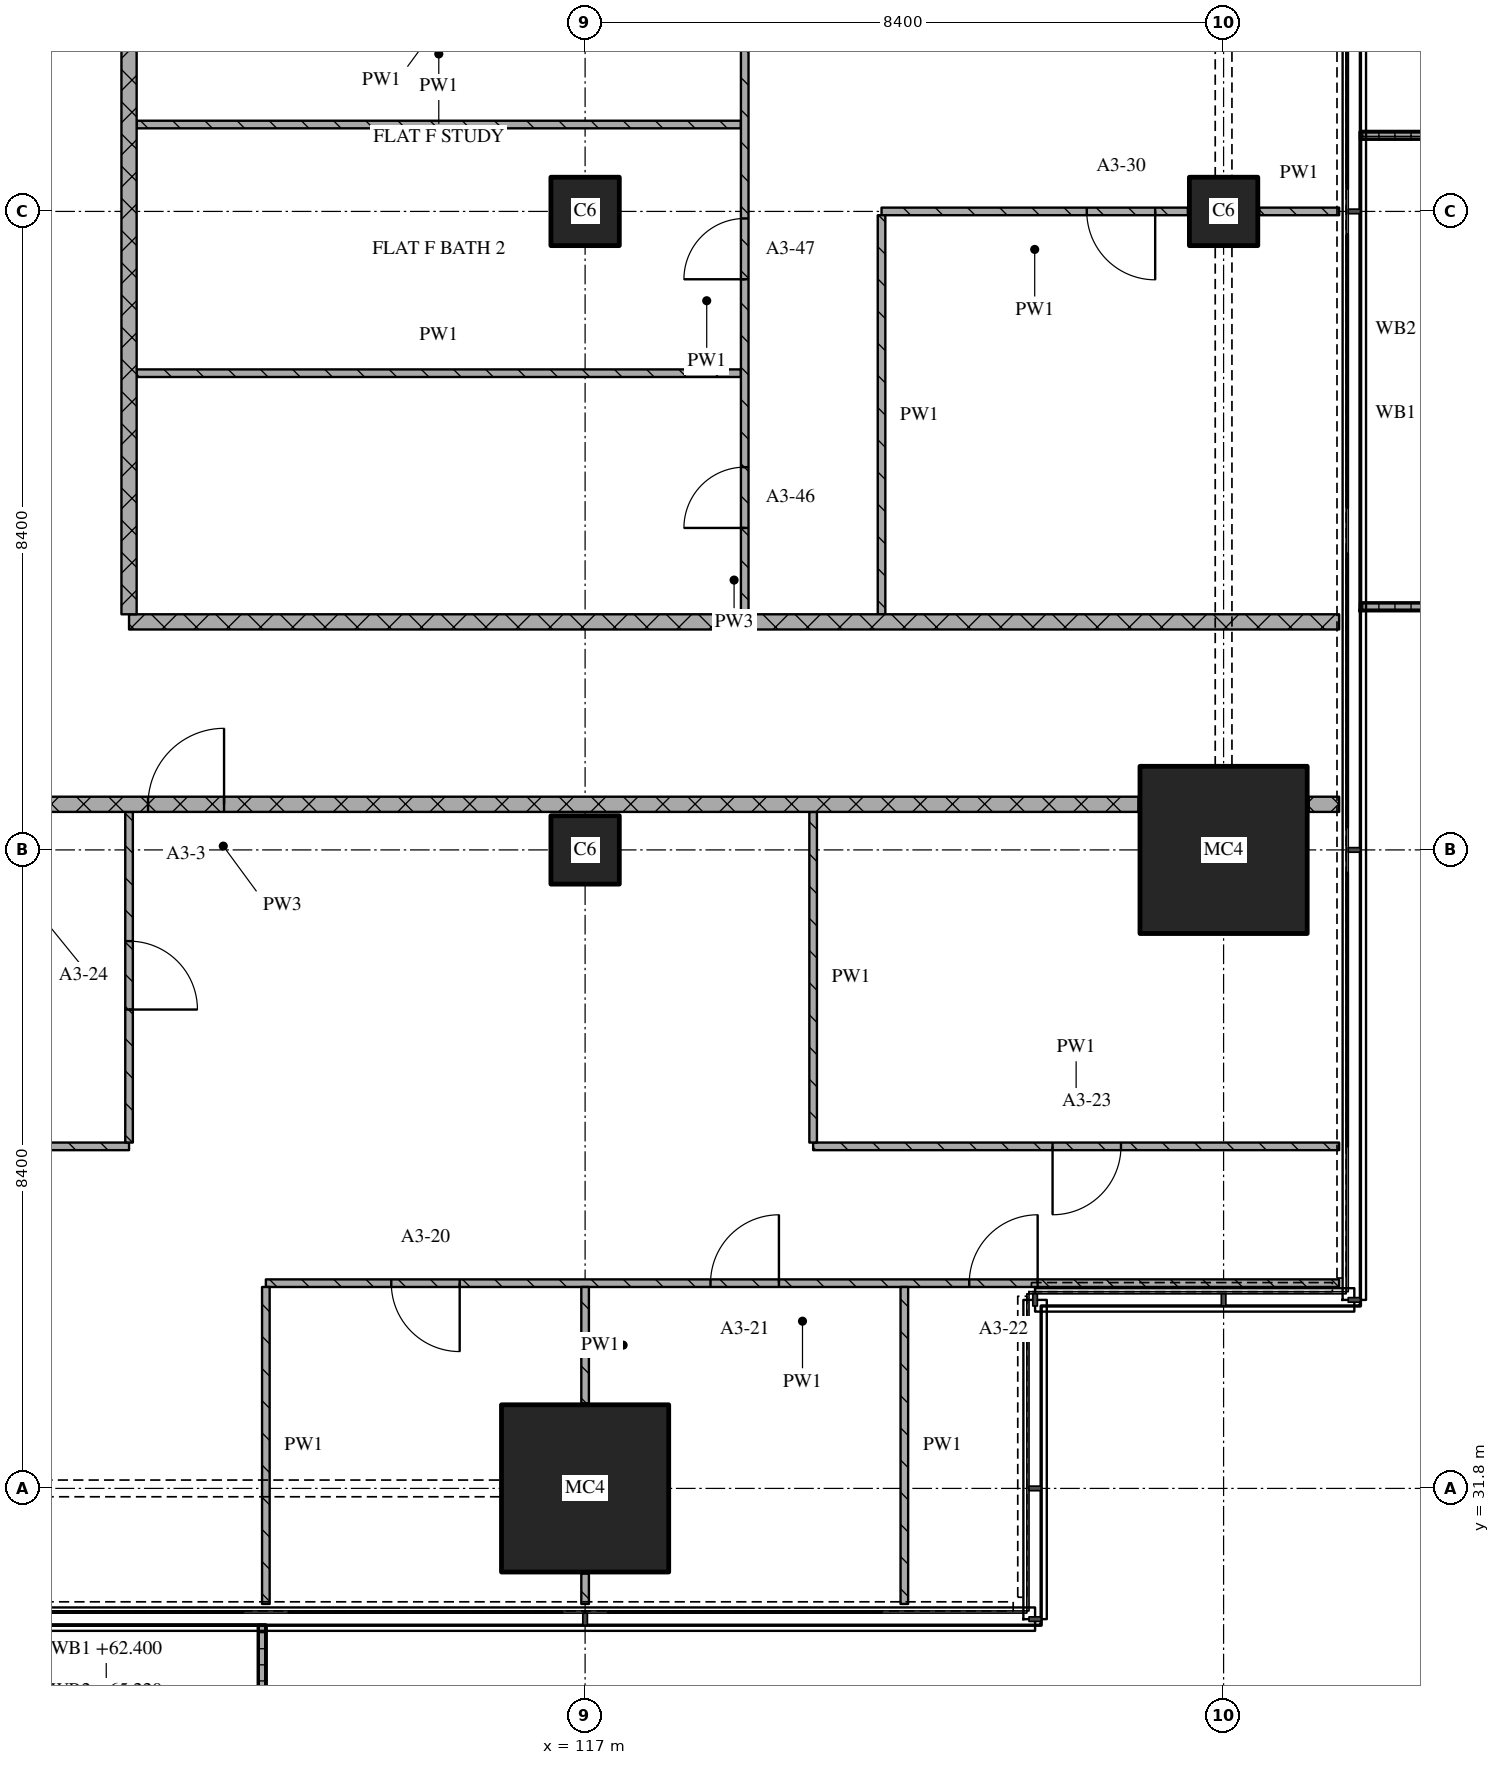
"""IFC4 building model, lengths in metres.
Left out: names, types, materials, properties, quantities, classifications, styles, units other than length and angle.
Written with IfcOpenShell. Run it as: python <this file> out.ifc"""

import sys

from ifc_helpers import new_model, si_unit, direction, frame, frame_2d, origin, origin_2d, place, context, subcontext, project, spatial, polyline, rectangle, outline, extrude, element, fill, save


model = new_model("IFC4")
c1 = context("Model", 3, precision=1e-05, world=origin(), true_north=direction((0.0, 1.0)))
c2 = subcontext(c1, "Body", "Model", "MODEL_VIEW")
j1 = project(units=[si_unit("LENGTHUNIT", "METRE"), si_unit("PLANEANGLEUNIT", "RADIAN")], contexts=[c1])
p1 = place(None, origin())
s1 = spatial("IfcSite", under=j1, at=p1, CompositionType="ELEMENT")
p2 = place(p1, origin())
s2 = spatial("IfcBuilding", under=s1, at=p2, CompositionType="ELEMENT")
p3 = place(p2, frame((0.0, 0.0, 62.4)))
s3 = spatial("IfcBuildingStorey", under=s2, at=p3, CompositionType="ELEMENT", Elevation=62.4)
p4 = place(p3, frame((117.0, 31.8, 0.0), z_axis=(0.0, 0.0, 1.0), x_axis=(1.0, 0.0, 0.0)))
e1 = element("IfcColumn", 1, at=p4, inside=s3, PredefinedType="COLUMN", context=c2, shape_type="SweptSolid", body=[
    extrude(rectangle(XDim=2.2, YDim=2.2, at=origin_2d()), origin(), (0.0, 0.0, 1.0), 3.6),
])
for number, where, z_axis, x_axis in (
    (2, (117.0, 40.2, 0.0), (0.0, 0.0, 1.0), (1.0, 0.0, 0.0)),
    (3, (117.0, 48.6, 0.0), (0.0, 0.0, 1.0), (1.0, 0.0, 0.0)),
):
    element("IfcColumn", number, at=place(p3, frame(where, z_axis=z_axis, x_axis=x_axis)), inside=s3, PredefinedType="COLUMN", context=c2, shape_type="SweptSolid", body=[
        extrude(rectangle(XDim=0.9, YDim=0.9, at=origin_2d()), origin(), (0.0, 0.0, 1.0), 3.6),
    ])
p5 = place(p3, frame((125.4, 40.2, 0.0), z_axis=(0.0, 0.0, 1.0), x_axis=(1.0, 0.0, 0.0)))
e4 = element("IfcColumn", 4, at=p5, inside=s3, PredefinedType="COLUMN", context=c2, shape_type="SweptSolid", body=[
    extrude(rectangle(XDim=2.2, YDim=2.2, at=origin_2d()), origin(), (0.0, 0.0, 1.0), 3.6),
])
p6 = place(p3, frame((125.4, 48.6, 0.0), z_axis=(0.0, 0.0, 1.0), x_axis=(1.0, 0.0, 0.0)))
e5 = element("IfcColumn", 5, at=p6, inside=s3, PredefinedType="COLUMN", context=c2, shape_type="SweptSolid", body=[
    extrude(rectangle(XDim=0.9, YDim=0.9, at=origin_2d()), origin(), (0.0, 0.0, 1.0), 3.6),
])
p7 = place(p3, origin())
e6 = element("IfcWall", 6, at=p7, inside=s3, PredefinedType="SOLIDWALL", context=c2, shape_type="SweptSolid", body=[
    extrude(outline(polyline([(108.6, 30.0), (108.7, 30.0), (108.7, 28.367), (112.7, 28.367), (112.7, 30.0), (112.8, 30.0), (112.8, 28.267), (108.6, 28.267), (108.6, 30.0)])), origin(), (0.0, 0.0, 1.0), 1.0),
])
p8 = place(p3, origin())
e7 = element("IfcWall", 7, at=p8, inside=s3, PredefinedType="SOLIDWALL", context=c2, shape_type="SweptSolid", body=[
    extrude(outline(polyline([(127.2, 43.35), (127.2, 43.45), (128.967, 43.45), (128.967, 49.55), (127.2, 49.55), (127.2, 49.65), (129.067, 49.65), (129.067, 43.35), (127.2, 43.35)])), origin(), (0.0, 0.0, 1.0), 1.0),
])
p9 = place(p3, frame((126.92, 34.5, 0.0), z_axis=(0.0, 0.0, 1.0), x_axis=(-1.0, 0.0, 0.0)))
e8 = element("IfcWall", 8, at=p9, inside=s3, PredefinedType="PARTITIONING", context=c2, shape_type="SweptSolid", body=[
    extrude(rectangle(XDim=14.12, YDim=0.1, at=frame_2d((7.06, 0.0))), origin(), (0.0, 0.0, 1.0), 3.32),
])
p10 = place(p9, frame((3.966, 0.0, 0.0)))
e9 = element("IfcOpeningElement", 9, at=p10, cuts=e8, PredefinedType="OPENING", context=c2, shape_type="SweptSolid", body=[
    extrude(rectangle(XDim=0.9, YDim=2.1, at=frame_2d((0.45, 1.05))), frame((0.0, 0.06, 0.0), z_axis=(0.0, -1.0, 0.0), x_axis=(1.0, 0.0, 0.0)), (0.0, 0.0, 1.0), 0.12),
])
p11 = place(p9, frame((7.37, 0.0, 0.0)))
e10 = element("IfcOpeningElement", 10, at=p11, cuts=e8, PredefinedType="OPENING", context=c2, shape_type="SweptSolid", body=[
    extrude(rectangle(XDim=0.9, YDim=2.1, at=frame_2d((0.45, 1.05))), frame((0.0, 0.06, 0.0), z_axis=(0.0, -1.0, 0.0), x_axis=(1.0, 0.0, 0.0)), (0.0, 0.0, 1.0), 0.12),
])
p12 = place(p9, frame((11.57, 0.0, 0.0)))
e11 = element("IfcOpeningElement", 11, at=p12, cuts=e8, PredefinedType="OPENING", context=c2, shape_type="SweptSolid", body=[
    extrude(rectangle(XDim=0.9, YDim=2.1, at=frame_2d((0.45, 1.05))), frame((0.0, 0.06, 0.0), z_axis=(0.0, -1.0, 0.0), x_axis=(1.0, 0.0, 0.0)), (0.0, 0.0, 1.0), 0.12),
])
p13 = place(p3, frame((100.3, 36.3, 0.0), z_axis=(0.0, 0.0, 1.0), x_axis=(1.0, 0.0, 0.0)))
e12 = element("IfcWall", 12, at=p13, inside=s3, PredefinedType="PARTITIONING", context=c2, shape_type="SweptSolid", body=[
    extrude(rectangle(XDim=10.7, YDim=0.1, at=frame_2d((5.35, 0.0))), origin(), (0.0, 0.0, 1.0), 3.32),
])
p14 = place(p13, frame((1.75, 0.0, 0.0)))
e13 = element("IfcOpeningElement", 13, at=p14, cuts=e12, PredefinedType="OPENING", context=c2, shape_type="SweptSolid", body=[
    extrude(rectangle(XDim=0.8, YDim=2.1, at=frame_2d((0.4, 1.05))), frame((0.0, 0.06, 0.0), z_axis=(0.0, -1.0, 0.0), x_axis=(1.0, 0.0, 0.0)), (0.0, 0.0, 1.0), 0.12),
])
p15 = place(p13, frame((6.25, 0.0, 0.0)))
e14 = element("IfcOpeningElement", 14, at=p15, cuts=e12, PredefinedType="OPENING", context=c2, shape_type="SweptSolid", body=[
    extrude(rectangle(XDim=0.8, YDim=2.1, at=frame_2d((0.4, 1.05))), frame((0.0, 0.06, 0.0), z_axis=(0.0, -1.0, 0.0), x_axis=(1.0, 0.0, 0.0)), (0.0, 0.0, 1.0), 0.12),
])
p16 = place(p3, frame((120.0, 36.3, 0.0), z_axis=(0.0, 0.0, 1.0), x_axis=(1.0, 0.0, 0.0)))
e15 = element("IfcWall", 15, at=p16, inside=s3, PredefinedType="PARTITIONING", context=c2, shape_type="SweptSolid", body=[
    extrude(rectangle(XDim=6.92, YDim=0.1, at=frame_2d((3.46, 0.0))), origin(), (0.0, 0.0, 1.0), 3.32),
])
p17 = place(p16, frame((3.15, 0.0, 0.0)))
e16 = element("IfcOpeningElement", 16, at=p17, cuts=e15, PredefinedType="OPENING", context=c2, shape_type="SweptSolid", body=[
    extrude(rectangle(XDim=0.9, YDim=2.1, at=frame_2d((0.45, 1.05))), frame((0.0, 0.06, 0.0), z_axis=(0.0, -1.0, 0.0), x_axis=(1.0, 0.0, 0.0)), (0.0, 0.0, 1.0), 0.12),
])
p18 = place(p3, frame((124.28, 40.8, 0.0), z_axis=(0.0, 0.0, 1.0), x_axis=(-1.0, 0.0, 0.0)))
e17 = element("IfcWall", 17, at=p18, inside=s3, PredefinedType="PARTITIONING", context=c2, shape_type="SweptSolid", body=[
    extrude(rectangle(XDim=24.08, YDim=0.2, at=frame_2d((12.04, 0.0))), origin(), (0.0, 0.0, 1.0), 3.32),
])
p19 = place(p18, frame((12.03, 0.0, 0.0)))
e18 = element("IfcOpeningElement", 18, at=p19, cuts=e17, PredefinedType="OPENING", context=c2, shape_type="SweptSolid", body=[
    extrude(rectangle(XDim=1.0, YDim=2.1, at=frame_2d((0.5, 1.05))), frame((0.0, 0.11, 0.0), z_axis=(0.0, -1.0, 0.0), x_axis=(1.0, 0.0, 0.0)), (0.0, 0.0, 1.0), 0.22),
])
p20 = place(p3, frame((126.52, 40.8, 0.0), z_axis=(0.0, 0.0, 1.0), x_axis=(1.0, 0.0, 0.0)))
e19 = element("IfcWall", 19, at=p20, inside=s3, PredefinedType="PARTITIONING", context=c2, shape_type="SweptSolid", body=[
    extrude(rectangle(XDim=0.4, YDim=0.2, at=frame_2d((0.2, 0.0))), origin(), (0.0, 0.0, 1.0), 3.32),
])
p21 = place(p3, frame((111.0, 43.2, 0.0), z_axis=(0.0, 0.0, 1.0), x_axis=(1.0, 0.0, 0.0)))
e20 = element("IfcWall", 20, at=p21, inside=s3, PredefinedType="PARTITIONING", context=c2, shape_type="SweptSolid", body=[
    extrude(rectangle(XDim=15.92, YDim=0.2, at=frame_2d((7.96, 0.0))), origin(), (0.0, 0.0, 1.0), 3.32),
])
p22 = place(p3, frame((111.1, 46.472, 0.0), z_axis=(0.0, 0.0, 1.0), x_axis=(1.0, 0.0, 0.0)))
e21 = element("IfcWall", 21, at=p22, inside=s3, PredefinedType="PARTITIONING", context=c2, shape_type="SweptSolid", body=[
    extrude(rectangle(XDim=7.95, YDim=0.1, at=frame_2d((3.975, 0.0))), origin(), (0.0, 0.0, 1.0), 3.32),
])
p23 = place(p3, frame((124.93, 48.6, 0.0), z_axis=(0.0, 0.0, 1.0), x_axis=(-1.0, 0.0, 0.0)))
e22 = element("IfcWall", 22, at=p23, inside=s3, PredefinedType="PARTITIONING", context=c2, shape_type="SweptSolid", body=[
    extrude(rectangle(XDim=4.03, YDim=0.1, at=frame_2d((2.015, 0.0))), origin(), (0.0, 0.0, 1.0), 3.32),
])
p24 = place(p23, frame((0.43, 0.0, 0.0)))
e23 = element("IfcOpeningElement", 23, at=p24, cuts=e22, PredefinedType="OPENING", context=c2, shape_type="SweptSolid", body=[
    extrude(rectangle(XDim=0.9, YDim=2.1, at=frame_2d((0.45, 1.05))), frame((0.0, 0.06, 0.0), z_axis=(0.0, -1.0, 0.0), x_axis=(1.0, 0.0, 0.0)), (0.0, 0.0, 1.0), 0.12),
])
p25 = place(p3, frame((125.87, 48.6, 0.0), z_axis=(0.0, 0.0, 1.0), x_axis=(1.0, 0.0, 0.0)))
e24 = element("IfcWall", 24, at=p25, inside=s3, PredefinedType="PARTITIONING", context=c2, shape_type="SweptSolid", body=[
    extrude(rectangle(XDim=1.05, YDim=0.1, at=frame_2d((0.525, 0.0))), origin(), (0.0, 0.0, 1.0), 3.32),
])
p26 = place(p3, frame((111.1, 49.743, 0.0), z_axis=(0.0, 0.0, 1.0), x_axis=(1.0, 0.0, 0.0)))
e25 = element("IfcWall", 25, at=p26, inside=s3, PredefinedType="PARTITIONING", context=c2, shape_type="SweptSolid", body=[
    extrude(rectangle(XDim=7.95, YDim=0.1, at=frame_2d((3.975, 0.0))), origin(), (0.0, 0.0, 1.0), 3.32),
])
p27 = place(p3, frame((111.0, 75.32, 0.0), z_axis=(0.0, 0.0, 1.0), x_axis=(0.0, -1.0, 0.0)))
e26 = element("IfcWall", 26, at=p27, inside=s3, PredefinedType="PARTITIONING", context=c2, shape_type="SweptSolid", body=[
    extrude(rectangle(XDim=32.02, YDim=0.2, at=frame_2d((16.01, 0.0))), origin(), (0.0, 0.0, 1.0), 3.32),
])
p28 = place(p27, frame((6.27, 0.0, 0.0)))
e27 = element("IfcOpeningElement", 27, at=p28, cuts=e26, PredefinedType="OPENING", context=c2, shape_type="SweptSolid", body=[
    extrude(rectangle(XDim=1.0, YDim=2.1, at=frame_2d((0.5, 1.05))), frame((0.0, 0.11, 0.0), z_axis=(0.0, -1.0, 0.0), x_axis=(1.0, 0.0, 0.0)), (0.0, 0.0, 1.0), 0.22),
])
p29 = place(p27, frame((22.47, 0.0, 0.0)))
e28 = element("IfcOpeningElement", 28, at=p29, cuts=e26, PredefinedType="OPENING", context=c2, shape_type="SweptSolid", body=[
    extrude(rectangle(XDim=1.0, YDim=2.1, at=frame_2d((0.5, 1.05))), frame((0.0, 0.11, 0.0), z_axis=(0.0, -1.0, 0.0), x_axis=(1.0, 0.0, 0.0)), (0.0, 0.0, 1.0), 0.22),
])
p30 = place(p3, frame((111.0, 36.35, 0.0), z_axis=(0.0, 0.0, 1.0), x_axis=(0.0, 1.0, 0.0)))
e29 = element("IfcWall", 29, at=p30, inside=s3, PredefinedType="PARTITIONING", context=c2, shape_type="SweptSolid", body=[
    extrude(rectangle(XDim=4.35, YDim=0.1, at=frame_2d((2.175, 0.0))), origin(), (0.0, 0.0, 1.0), 3.32),
])
p31 = place(p30, frame((1.75, 0.0, 0.0)))
e30 = element("IfcOpeningElement", 30, at=p31, cuts=e29, PredefinedType="OPENING", context=c2, shape_type="SweptSolid", body=[
    extrude(rectangle(XDim=0.9, YDim=2.1, at=frame_2d((0.45, 1.05))), frame((0.0, 0.06, 0.0), z_axis=(0.0, -1.0, 0.0), x_axis=(1.0, 0.0, 0.0)), (0.0, 0.0, 1.0), 0.12),
])
p32 = place(p3, frame((112.8, 34.45, 0.0), z_axis=(0.0, 0.0, 1.0), x_axis=(0.0, -1.0, 0.0)))
e31 = element("IfcWall", 31, at=p32, inside=s3, PredefinedType="PARTITIONING", context=c2, shape_type="SweptSolid", body=[
    extrude(rectangle(XDim=4.17, YDim=0.1, at=frame_2d((2.085, 0.0))), origin(), (0.0, 0.0, 1.0), 3.32),
])
p33 = place(p3, frame((117.0, 30.68, 0.0), z_axis=(0.0, 0.0, 1.0), x_axis=(0.0, -1.0, 0.0)))
e32 = element("IfcWall", 32, at=p33, inside=s3, PredefinedType="PARTITIONING", context=c2, shape_type="SweptSolid", body=[
    extrude(rectangle(XDim=0.4, YDim=0.1, at=frame_2d((0.2, 0.0))), origin(), (0.0, 0.0, 1.0), 3.32),
])
p34 = place(p3, frame((117.0, 34.45, 0.0), z_axis=(0.0, 0.0, 1.0), x_axis=(0.0, -1.0, 0.0)))
e33 = element("IfcWall", 33, at=p34, inside=s3, PredefinedType="PARTITIONING", context=c2, shape_type="SweptSolid", body=[
    extrude(rectangle(XDim=1.53, YDim=0.1, at=frame_2d((0.765, 0.0))), origin(), (0.0, 0.0, 1.0), 3.32),
])
p35 = place(p3, frame((119.1, 43.3, 0.0), z_axis=(0.0, 0.0, 1.0), x_axis=(0.0, 1.0, 0.0)))
e34 = element("IfcWall", 34, at=p35, inside=s3, PredefinedType="PARTITIONING", context=c2, shape_type="SweptSolid", body=[
    extrude(rectangle(XDim=8.25, YDim=0.1, at=frame_2d((4.125, 0.0))), origin(), (0.0, 0.0, 1.0), 3.32),
])
p36 = place(p35, frame((1.136, 0.0, 0.0)))
e35 = element("IfcOpeningElement", 35, at=p36, cuts=e34, PredefinedType="OPENING", context=c2, shape_type="SweptSolid", body=[
    extrude(rectangle(XDim=0.8, YDim=2.1, at=frame_2d((0.4, 1.05))), frame((0.0, 0.06, 0.0), z_axis=(0.0, -1.0, 0.0), x_axis=(1.0, 0.0, 0.0)), (0.0, 0.0, 1.0), 0.12),
])
p37 = place(p35, frame((4.407, 0.0, 0.0)))
e36 = element("IfcOpeningElement", 36, at=p37, cuts=e34, PredefinedType="OPENING", context=c2, shape_type="SweptSolid", body=[
    extrude(rectangle(XDim=0.8, YDim=2.1, at=frame_2d((0.4, 1.05))), frame((0.0, 0.06, 0.0), z_axis=(0.0, -1.0, 0.0), x_axis=(1.0, 0.0, 0.0)), (0.0, 0.0, 1.0), 0.12),
])
p38 = place(p3, frame((120.0, 40.7, 0.0), z_axis=(0.0, 0.0, 1.0), x_axis=(0.0, -1.0, 0.0)))
e37 = element("IfcWall", 37, at=p38, inside=s3, PredefinedType="PARTITIONING", context=c2, shape_type="SweptSolid", body=[
    extrude(rectangle(XDim=4.35, YDim=0.1, at=frame_2d((2.175, 0.0))), origin(), (0.0, 0.0, 1.0), 3.32),
])
p39 = place(p3, frame((120.9, 48.55, 0.0), z_axis=(0.0, 0.0, 1.0), x_axis=(0.0, -1.0, 0.0)))
e38 = element("IfcWall", 38, at=p39, inside=s3, PredefinedType="PARTITIONING", context=c2, shape_type="SweptSolid", body=[
    extrude(rectangle(XDim=5.25, YDim=0.1, at=frame_2d((2.625, 0.0))), origin(), (0.0, 0.0, 1.0), 3.32),
])
p40 = place(p3, frame((121.2, 34.45, 0.0), z_axis=(0.0, 0.0, 1.0), x_axis=(0.0, -1.0, 0.0)))
e39 = element("IfcWall", 39, at=p40, inside=s3, PredefinedType="PARTITIONING", context=c2, shape_type="SweptSolid", body=[
    extrude(rectangle(XDim=4.17, YDim=0.1, at=frame_2d((2.085, 0.0))), origin(), (0.0, 0.0, 1.0), 3.32),
])
p41 = place(p10, origin())
e40 = element("IfcDoor", 40, at=p41, inside=s3, OperationType="SINGLE_SWING_RIGHT", PredefinedType="DOOR", context=c2, shape_type="SweptSolid", body=[
    extrude(rectangle(XDim=0.9, YDim=2.1, at=frame_2d((0.45, 1.05))), frame((0.0, 0.025, 0.0), z_axis=(0.0, -1.0, 0.0), x_axis=(1.0, 0.0, 0.0)), (0.0, 0.0, 1.0), 0.05),
])
fill(e9, e40)
p42 = place(p11, origin())
e41 = element("IfcDoor", 41, at=p42, inside=s3, OperationType="SINGLE_SWING_RIGHT", PredefinedType="DOOR", context=c2, shape_type="SweptSolid", body=[
    extrude(rectangle(XDim=0.9, YDim=2.1, at=frame_2d((0.45, 1.05))), frame((0.0, 0.025, 0.0), z_axis=(0.0, -1.0, 0.0), x_axis=(1.0, 0.0, 0.0)), (0.0, 0.0, 1.0), 0.05),
])
fill(e10, e41)
p43 = place(p12, origin())
e42 = element("IfcDoor", 42, at=p43, inside=s3, OperationType="SINGLE_SWING_LEFT", PredefinedType="DOOR", context=c2, shape_type="SweptSolid", body=[
    extrude(rectangle(XDim=0.9, YDim=2.1, at=frame_2d((0.45, 1.05))), frame((0.0, 0.025, 0.0), z_axis=(0.0, -1.0, 0.0), x_axis=(1.0, 0.0, 0.0)), (0.0, 0.0, 1.0), 0.05),
])
fill(e11, e42)
p44 = place(p17, origin())
e43 = element("IfcDoor", 43, at=p44, inside=s3, OperationType="SINGLE_SWING_RIGHT", PredefinedType="DOOR", context=c2, shape_type="SweptSolid", body=[
    extrude(rectangle(XDim=0.9, YDim=2.1, at=frame_2d((0.45, 1.05))), frame((0.0, 0.025, 0.0), z_axis=(0.0, -1.0, 0.0), x_axis=(1.0, 0.0, 0.0)), (0.0, 0.0, 1.0), 0.05),
])
fill(e16, e43)
p45 = place(p19, origin())
e44 = element("IfcDoor", 44, at=p45, inside=s3, OperationType="SINGLE_SWING_RIGHT", PredefinedType="DOOR", context=c2, shape_type="SweptSolid", body=[
    extrude(rectangle(XDim=1.0, YDim=2.1, at=frame_2d((0.5, 1.05))), frame((0.0, 0.025, 0.0), z_axis=(0.0, -1.0, 0.0), x_axis=(1.0, 0.0, 0.0)), (0.0, 0.0, 1.0), 0.05),
])
fill(e18, e44)
p46 = place(p24, origin())
e45 = element("IfcDoor", 45, at=p46, inside=s3, OperationType="SINGLE_SWING_LEFT", PredefinedType="DOOR", context=c2, shape_type="SweptSolid", body=[
    extrude(rectangle(XDim=0.9, YDim=2.1, at=frame_2d((0.45, 1.05))), frame((0.0, 0.025, 0.0), z_axis=(0.0, -1.0, 0.0), x_axis=(1.0, 0.0, 0.0)), (0.0, 0.0, 1.0), 0.05),
])
fill(e23, e45)
p47 = place(p31, origin())
e46 = element("IfcDoor", 46, at=p47, inside=s3, OperationType="SINGLE_SWING_RIGHT", PredefinedType="DOOR", context=c2, shape_type="SweptSolid", body=[
    extrude(rectangle(XDim=0.9, YDim=2.1, at=frame_2d((0.45, 1.05))), frame((0.0, 0.025, 0.0), z_axis=(0.0, -1.0, 0.0), x_axis=(1.0, 0.0, 0.0)), (0.0, 0.0, 1.0), 0.05),
])
fill(e30, e46)
p48 = place(p36, origin())
e47 = element("IfcDoor", 47, at=p48, inside=s3, OperationType="SINGLE_SWING_LEFT", PredefinedType="DOOR", context=c2, shape_type="SweptSolid", body=[
    extrude(rectangle(XDim=0.8, YDim=2.1, at=frame_2d((0.4, 1.05))), frame((0.0, 0.025, 0.0), z_axis=(0.0, -1.0, 0.0), x_axis=(1.0, 0.0, 0.0)), (0.0, 0.0, 1.0), 0.05),
])
fill(e35, e47)
p49 = place(p37, origin())
e48 = element("IfcDoor", 48, at=p49, inside=s3, OperationType="SINGLE_SWING_LEFT", PredefinedType="DOOR", context=c2, shape_type="SweptSolid", body=[
    extrude(rectangle(XDim=0.8, YDim=2.1, at=frame_2d((0.4, 1.05))), frame((0.0, 0.025, 0.0), z_axis=(0.0, -1.0, 0.0), x_axis=(1.0, 0.0, 0.0)), (0.0, 0.0, 1.0), 0.05),
])
fill(e36, e48)
save(model, sys.argv[1])
